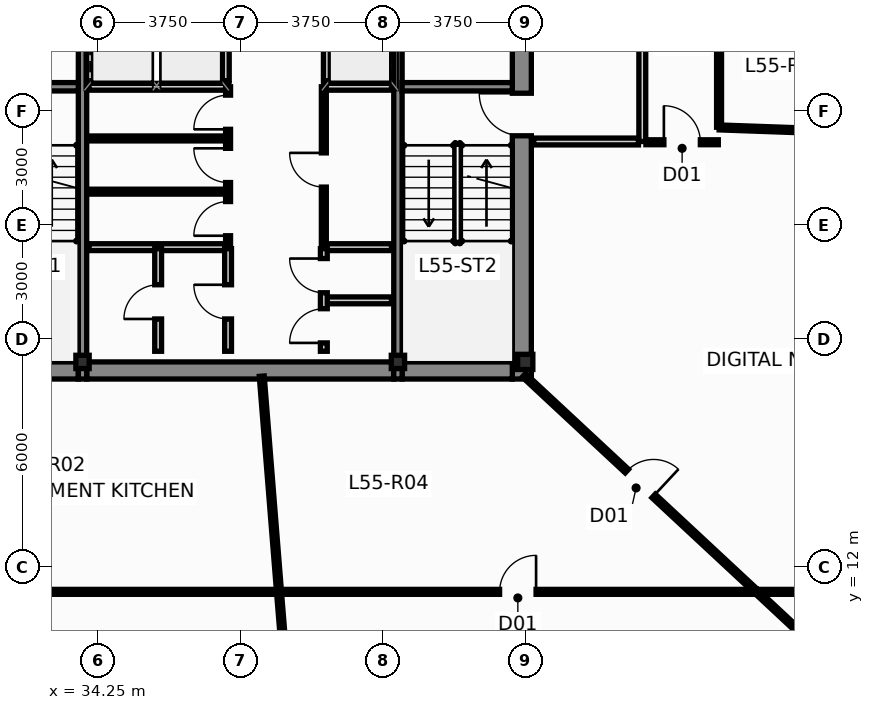
"""IFC4 building model, lengths in metres.
Left out: names, types, materials, properties, quantities, classifications, styles, units other than length and angle.
Written with IfcOpenShell. Run it as: python <this file> out.ifc"""

import sys

from ifc_helpers import new_model, si_unit, direction, frame, frame_2d, origin, origin_2d, place, context, subcontext, project, spatial, rectangle, hollow_rectangle, i_section, extrude, source, transform, mapped, element, fill, save


model = new_model("IFC4")
c1 = context("Model", 3, precision=1e-05, world=origin(), true_north=direction((0.0, 1.0)))
c2 = subcontext(c1, "Body", "Model", "MODEL_VIEW")
j1 = project(units=[si_unit("LENGTHUNIT", "METRE"), si_unit("PLANEANGLEUNIT", "RADIAN")], contexts=[c1])
p1 = place(None, origin())
s1 = spatial("IfcSite", under=j1, at=p1, CompositionType="ELEMENT")
p2 = place(p1, origin())
s2 = spatial("IfcBuilding", under=s1, at=p2, CompositionType="ELEMENT")
p3 = place(p2, frame((0.0, 0.0, 209.6)))
s3 = spatial("IfcBuildingStorey", under=s2, at=p3, CompositionType="ELEMENT", Elevation=209.6)
m1 = source(origin(), c2, "Body", "SweptSolid", [
    extrude(i_section(OverallWidth=0.4, OverallDepth=0.4, WebThickness=0.02, FlangeThickness=0.032, at=origin_2d()), origin(), (0.0, 0.0, 1.0), 3.65),
])
p4 = place(p3, frame((45.5, 17.4, 0.0), z_axis=(0.0, 0.0, 1.0), x_axis=(1.0, 0.0, 0.0)))
e1 = element("IfcColumn", 1, at=p4, inside=s3, PredefinedType="COLUMN", context=c2, shape_type="MappedRepresentation", body=[
    mapped(m1, transform((0.0, 0.0, 0.0), scale=1.0)),
])
m2 = source(origin(), c2, "Body", "SweptSolid", [
    extrude(hollow_rectangle(XDim=0.35, YDim=0.35, WallThickness=0.016, at=origin_2d()), origin(), (0.0, 0.0, 1.0), 3.65),
])
for number, where, z_axis, x_axis in (
    (2, (33.85, 17.4, 0.0), (0.0, 0.0, 1.0), (1.0, 0.0, 0.0)),
    (3, (42.15, 17.4, 0.0), (0.0, 0.0, 1.0), (1.0, 0.0, 0.0)),
):
    element("IfcColumn", number, at=place(p3, frame(where, z_axis=z_axis, x_axis=x_axis)), inside=s3, PredefinedType="COLUMN", context=c2, shape_type="MappedRepresentation", body=[
        mapped(m2, transform((0.0, 0.0, 0.0), scale=1.0)),
    ])
p5 = place(p3, frame((45.41, 16.95, 0.0), z_axis=(0.0, 0.0, 1.0), x_axis=(0.0, 1.0, 0.0)))
e4 = element("IfcWall", 4, at=p5, inside=s3, PredefinedType="SHEAR", context=c2, shape_type="SweptSolid", body=[
    extrude(rectangle(XDim=13.275, YDim=0.5, at=frame_2d((6.638, 0.0))), origin(), (0.0, 0.0, 1.0), 3.65),
])
p6 = place(p5, frame((6.4, 0.0, 0.0)))
e5 = element("IfcOpeningElement", 5, at=p6, cuts=e4, PredefinedType="OPENING", context=c2, shape_type="SweptSolid", body=[
    extrude(rectangle(XDim=1.12, YDim=2.15, at=frame_2d((0.56, 1.075))), frame((0.0, 0.262, 0.0), z_axis=(0.0, -1.0, 0.0), x_axis=(1.0, 0.0, 0.0)), (0.0, 0.0, 1.0), 0.524),
])
p7 = place(p5, frame((10.85, 0.0, 0.0)))
e6 = element("IfcOpeningElement", 6, at=p7, cuts=e4, PredefinedType="OPENING", context=c2, shape_type="SweptSolid", body=[
    extrude(rectangle(XDim=1.2, YDim=2.2, at=frame_2d((0.6, 1.1))), frame((0.0, 0.262, 0.0), z_axis=(0.0, -1.0, 0.0), x_axis=(1.0, 0.0, 0.0)), (0.0, 0.0, 1.0), 0.524),
])
p8 = place(p3, frame((30.84, 17.175, 0.0), z_axis=(0.0, 0.0, 1.0), x_axis=(1.0, 0.0, 0.0)))
e7 = element("IfcWall", 7, at=p8, inside=s3, PredefinedType="SHEAR", context=c2, shape_type="SweptSolid", body=[
    extrude(rectangle(XDim=2.9, YDim=0.45, at=frame_2d((1.45, 0.0))), origin(), (0.0, 0.0, 1.0), 3.65),
])
p9 = place(p3, frame((33.96, 17.175, 0.0), z_axis=(0.0, 0.0, 1.0), x_axis=(1.0, 0.0, 0.0)))
e8 = element("IfcWall", 8, at=p9, inside=s3, PredefinedType="SHEAR", context=c2, shape_type="SweptSolid", body=[
    extrude(rectangle(XDim=8.08, YDim=0.45, at=frame_2d((4.04, 0.0))), origin(), (0.0, 0.0, 1.0), 3.65),
])
p10 = place(p3, frame((42.26, 17.175, 0.0), z_axis=(0.0, 0.0, 1.0), x_axis=(1.0, 0.0, 0.0)))
e9 = element("IfcWall", 9, at=p10, inside=s3, PredefinedType="SHEAR", context=c2, shape_type="SweptSolid", body=[
    extrude(rectangle(XDim=2.9, YDim=0.45, at=frame_2d((1.45, 0.0))), origin(), (0.0, 0.0, 1.0), 3.65),
])
for number, where, z_axis, x_axis in (
    (10, (33.85, 16.95, 0.0), (0.0, 0.0, 1.0), (0.0, 1.0, 0.0)),
    (11, (42.15, 16.95, 0.0), (0.0, 0.0, 1.0), (0.0, 1.0, 0.0)),
):
    element("IfcWall", number, at=place(p3, frame(where, z_axis=z_axis, x_axis=x_axis)), inside=s3, PredefinedType="SHEAR", context=c2, shape_type="SweptSolid", body=[
        extrude(rectangle(XDim=13.275, YDim=0.22, at=frame_2d((6.638, 0.0))), origin(), (0.0, 0.0, 1.0), 3.65),
    ])
for number, where, z_axis, x_axis in (
    (12, (30.84, 24.64, 0.0), (0.0, 0.0, 1.0), (1.0, 0.0, 0.0)),
    (13, (42.26, 24.64, 0.0), (0.0, 0.0, 1.0), (1.0, 0.0, 0.0)),
):
    element("IfcWall", number, at=place(p3, frame(where, z_axis=z_axis, x_axis=x_axis)), inside=s3, PredefinedType="SHEAR", context=c2, shape_type="SweptSolid", body=[
        extrude(rectangle(XDim=2.9, YDim=0.22, at=frame_2d((1.45, 0.0))), origin(), (0.0, 0.0, 1.0), 3.65),
    ])
for number, where, z_axis, x_axis in (
    (14, (37.62, 24.8, 0.0), (0.0, 0.0, 1.0), (0.0, 1.0, 0.0)),
    (15, (40.28, 24.8, 0.0), (0.0, 0.0, 1.0), (0.0, 1.0, 0.0)),
):
    element("IfcWall", number, at=place(p3, frame(where, z_axis=z_axis, x_axis=x_axis)), inside=s3, PredefinedType="PARTITIONING", context=c2, shape_type="SweptSolid", body=[
        extrude(rectangle(XDim=2.0, YDim=0.18, at=frame_2d((1.0, 0.0))), origin(), (0.0, 0.0, 1.0), 3.4),
    ])
p11 = place(p3, frame((34.02, 24.64, 0.0), z_axis=(0.0, 0.0, 1.0), x_axis=(1.0, 0.0, 0.0)))
e16 = element("IfcWall", 16, at=p11, inside=s3, PredefinedType="PARTITIONING", context=c2, shape_type="SweptSolid", body=[
    extrude(rectangle(XDim=3.68, YDim=0.18, at=frame_2d((1.84, 0.0))), origin(), (0.0, 0.0, 1.0), 3.4),
])
p12 = place(p3, frame((40.2, 24.64, 0.0), z_axis=(0.0, 0.0, 1.0), x_axis=(1.0, 0.0, 0.0)))
e17 = element("IfcWall", 17, at=p12, inside=s3, PredefinedType="PARTITIONING", context=c2, shape_type="SweptSolid", body=[
    extrude(rectangle(XDim=1.78, YDim=0.18, at=frame_2d((0.89, 0.0))), origin(), (0.0, 0.0, 1.0), 3.4),
])
p13 = place(p3, frame((48.58, 23.2, 0.0), z_axis=(0.0, 0.0, 1.0), x_axis=(0.0, 1.0, 0.0)))
e18 = element("IfcWall", 18, at=p13, inside=s3, PredefinedType="PARTITIONING", context=c2, shape_type="SweptSolid", body=[
    extrude(rectangle(XDim=6.4, YDim=0.18, at=frame_2d((3.2, 0.0))), origin(), (0.0, 0.0, 1.0), 3.078),
])
p14 = place(p13, frame((2.65, 0.0, 0.0)))
e19 = element("IfcOpeningElement", 19, at=p14, cuts=e18, PredefinedType="OPENING", context=c2, shape_type="SweptSolid", body=[
    extrude(rectangle(XDim=1.05, YDim=2.15, at=frame_2d((0.525, 1.075))), frame((0.0, 0.102, 0.0), z_axis=(0.0, -1.0, 0.0), x_axis=(1.0, 0.0, 0.0)), (0.0, 0.0, 1.0), 0.204),
])
p15 = place(p3, frame((45.72, 23.2, 0.0), z_axis=(0.0, 0.0, 1.0), x_axis=(1.0, 0.0, 0.0)))
e20 = element("IfcWall", 20, at=p15, inside=s3, PredefinedType="PARTITIONING", context=c2, shape_type="SweptSolid", body=[
    extrude(rectangle(XDim=2.76, YDim=0.18, at=frame_2d((1.38, 0.0))), origin(), (0.0, 0.0, 1.0), 3.4),
])
p16 = place(p3, frame((34.02, 20.42, 0.0), z_axis=(0.0, 0.0, 1.0), x_axis=(1.0, 0.0, 0.0)))
e21 = element("IfcWall", 21, at=p16, inside=s3, PredefinedType="PARTITIONING", context=c2, shape_type="SweptSolid", body=[
    extrude(rectangle(XDim=3.64, YDim=0.18, at=frame_2d((1.82, 0.0))), origin(), (0.0, 0.0, 1.0), 3.4),
])
p17 = place(p3, frame((40.22, 20.42, 0.0), z_axis=(0.0, 0.0, 1.0), x_axis=(1.0, 0.0, 0.0)))
e22 = element("IfcWall", 22, at=p17, inside=s3, PredefinedType="PARTITIONING", context=c2, shape_type="SweptSolid", body=[
    extrude(rectangle(XDim=1.76, YDim=0.18, at=frame_2d((0.88, 0.0))), origin(), (0.0, 0.0, 1.0), 3.4),
])
for number, where, z_axis, x_axis in (
    (23, (34.02, 21.88, 0.0), (0.0, 0.0, 1.0), (1.0, 0.0, 0.0)),
    (24, (34.02, 23.28, 0.0), (0.0, 0.0, 1.0), (1.0, 0.0, 0.0)),
):
    element("IfcWall", number, at=place(p3, frame(where, z_axis=z_axis, x_axis=x_axis)), inside=s3, PredefinedType="PARTITIONING", context=c2, shape_type="SweptSolid", body=[
        extrude(rectangle(XDim=3.58, YDim=0.13, at=frame_2d((1.79, 0.0))), origin(), (0.0, 0.0, 1.0), 3.4),
    ])
p18 = place(p3, frame((37.68, 20.5, 0.0), z_axis=(0.0, 0.0, 1.0), x_axis=(0.0, 1.0, 0.0)))
e25 = element("IfcWall", 25, at=p18, inside=s3, PredefinedType="PARTITIONING", context=c2, shape_type="SweptSolid", body=[
    extrude(rectangle(XDim=4.14, YDim=0.13, at=frame_2d((2.07, 0.0))), origin(), (0.0, 0.0, 1.0), 3.4),
])
p19 = place(p18, frame((0.22, 0.0, 0.0)))
e26 = element("IfcOpeningElement", 26, at=p19, cuts=e25, PredefinedType="OPENING", context=c2, shape_type="SweptSolid", body=[
    extrude(rectangle(XDim=0.9, YDim=2.1, at=frame_2d((0.45, 1.05))), frame((0.0, 0.077, 0.0), z_axis=(0.0, -1.0, 0.0), x_axis=(1.0, 0.0, 0.0)), (0.0, 0.0, 1.0), 0.154),
])
p20 = place(p18, frame((1.62, 0.0, 0.0)))
e27 = element("IfcOpeningElement", 27, at=p20, cuts=e25, PredefinedType="OPENING", context=c2, shape_type="SweptSolid", body=[
    extrude(rectangle(XDim=0.9, YDim=2.1, at=frame_2d((0.45, 1.05))), frame((0.0, 0.077, 0.0), z_axis=(0.0, -1.0, 0.0), x_axis=(1.0, 0.0, 0.0)), (0.0, 0.0, 1.0), 0.154),
])
p21 = place(p18, frame((3.02, 0.0, 0.0)))
e28 = element("IfcOpeningElement", 28, at=p21, cuts=e25, PredefinedType="OPENING", context=c2, shape_type="SweptSolid", body=[
    extrude(rectangle(XDim=0.9, YDim=2.1, at=frame_2d((0.45, 1.05))), frame((0.0, 0.077, 0.0), z_axis=(0.0, -1.0, 0.0), x_axis=(1.0, 0.0, 0.0)), (0.0, 0.0, 1.0), 0.154),
])
p22 = place(p3, frame((40.2, 20.5, 0.0), z_axis=(0.0, 0.0, 1.0), x_axis=(0.0, 1.0, 0.0)))
e29 = element("IfcWall", 29, at=p22, inside=s3, PredefinedType="PARTITIONING", context=c2, shape_type="SweptSolid", body=[
    extrude(rectangle(XDim=4.14, YDim=0.13, at=frame_2d((2.07, 0.0))), origin(), (0.0, 0.0, 1.0), 3.4),
])
p23 = place(p22, frame((1.5, 0.0, 0.0)))
e30 = element("IfcOpeningElement", 30, at=p23, cuts=e29, PredefinedType="OPENING", context=c2, shape_type="SweptSolid", body=[
    extrude(rectangle(XDim=0.9, YDim=2.1, at=frame_2d((0.45, 1.05))), frame((0.0, 0.077, 0.0), z_axis=(0.0, -1.0, 0.0), x_axis=(1.0, 0.0, 0.0)), (0.0, 0.0, 1.0), 0.154),
])
p24 = place(p3, frame((35.84, 17.68, 0.0), z_axis=(0.0, 0.0, 1.0), x_axis=(0.0, 1.0, 0.0)))
e31 = element("IfcWall", 31, at=p24, inside=s3, PredefinedType="PARTITIONING", context=c2, shape_type="SweptSolid", body=[
    extrude(rectangle(XDim=2.7, YDim=0.18, at=frame_2d((1.35, 0.0))), origin(), (0.0, 0.0, 1.0), 3.4),
])
p25 = place(p24, frame((0.85, 0.0, 0.0)))
e32 = element("IfcOpeningElement", 32, at=p25, cuts=e31, PredefinedType="OPENING", context=c2, shape_type="SweptSolid", body=[
    extrude(rectangle(XDim=0.9, YDim=2.1, at=frame_2d((0.45, 1.05))), frame((0.0, 0.102, 0.0), z_axis=(0.0, -1.0, 0.0), x_axis=(1.0, 0.0, 0.0)), (0.0, 0.0, 1.0), 0.204),
])
p26 = place(p3, frame((37.68, 17.68, 0.0), z_axis=(0.0, 0.0, 1.0), x_axis=(0.0, 1.0, 0.0)))
e33 = element("IfcWall", 33, at=p26, inside=s3, PredefinedType="PARTITIONING", context=c2, shape_type="SweptSolid", body=[
    extrude(rectangle(XDim=2.7, YDim=0.18, at=frame_2d((1.35, 0.0))), origin(), (0.0, 0.0, 1.0), 3.4),
])
p27 = place(p26, frame((0.85, 0.0, 0.0)))
e34 = element("IfcOpeningElement", 34, at=p27, cuts=e33, PredefinedType="OPENING", context=c2, shape_type="SweptSolid", body=[
    extrude(rectangle(XDim=0.9, YDim=2.1, at=frame_2d((0.45, 1.05))), frame((0.0, 0.102, 0.0), z_axis=(0.0, -1.0, 0.0), x_axis=(1.0, 0.0, 0.0)), (0.0, 0.0, 1.0), 0.204),
])
p28 = place(p3, frame((40.28, 19.02, 0.0), z_axis=(0.0, 0.0, 1.0), x_axis=(1.0, 0.0, 0.0)))
e35 = element("IfcWall", 35, at=p28, inside=s3, PredefinedType="PARTITIONING", context=c2, shape_type="SweptSolid", body=[
    extrude(rectangle(XDim=1.7, YDim=0.18, at=frame_2d((0.85, 0.0))), origin(), (0.0, 0.0, 1.0), 3.4),
])
p29 = place(p3, frame((40.2, 17.68, 0.0), z_axis=(0.0, 0.0, 1.0), x_axis=(0.0, 1.0, 0.0)))
e36 = element("IfcWall", 36, at=p29, inside=s3, PredefinedType="PARTITIONING", context=c2, shape_type="SweptSolid", body=[
    extrude(rectangle(XDim=2.7, YDim=0.18, at=frame_2d((1.35, 0.0))), origin(), (0.0, 0.0, 1.0), 3.4),
])
p30 = place(p29, frame((0.22, 0.0, 0.0)))
e37 = element("IfcOpeningElement", 37, at=p30, cuts=e36, PredefinedType="OPENING", context=c2, shape_type="SweptSolid", body=[
    extrude(rectangle(XDim=0.9, YDim=2.1, at=frame_2d((0.45, 1.05))), frame((0.0, 0.102, 0.0), z_axis=(0.0, -1.0, 0.0), x_axis=(1.0, 0.0, 0.0)), (0.0, 0.0, 1.0), 0.204),
])
p31 = place(p29, frame((1.54, 0.0, 0.0)))
e38 = element("IfcOpeningElement", 38, at=p31, cuts=e36, PredefinedType="OPENING", context=c2, shape_type="SweptSolid", body=[
    extrude(rectangle(XDim=0.9, YDim=2.1, at=frame_2d((0.45, 1.05))), frame((0.0, 0.102, 0.0), z_axis=(0.0, -1.0, 0.0), x_axis=(1.0, 0.0, 0.0)), (0.0, 0.0, 1.0), 0.204),
])
p32 = place(p3, frame((15.22, 11.35, 0.0), z_axis=(0.0, 0.0, 1.0), x_axis=(1.0, 0.0, 0.0)))
e39 = element("IfcWall", 39, at=p32, inside=s3, PredefinedType="PARTITIONING", context=c2, shape_type="SweptSolid", body=[
    extrude(rectangle(XDim=23.795, YDim=0.13, at=frame_2d((11.897, 0.0))), origin(), (0.0, 0.0, 1.0), 3.078),
])
p33 = place(p32, frame((11.473, 0.0, 0.0)))
e40 = element("IfcOpeningElement", 40, at=p33, cuts=e39, PredefinedType="OPENING", context=c2, shape_type="SweptSolid", body=[
    extrude(rectangle(XDim=0.96, YDim=2.15, at=frame_2d((0.48, 1.075))), frame((0.0, 0.077, 0.0), z_axis=(0.0, -1.0, 0.0), x_axis=(1.0, 0.0, 0.0)), (0.0, 0.0, 1.0), 0.154),
])
p34 = place(p3, frame((39.025, 11.35, 0.0), z_axis=(0.0, 0.0, 1.0), x_axis=(1.0, 0.0, 0.0)))
e41 = element("IfcWall", 41, at=p34, inside=s3, PredefinedType="PARTITIONING", context=c2, shape_type="SweptSolid", body=[
    extrude(rectangle(XDim=12.56, YDim=0.13, at=frame_2d((6.28, 0.0))), origin(), (0.0, 0.0, 1.0), 3.078),
])
p35 = place(p34, frame((5.8, 0.0, 0.0)))
e42 = element("IfcOpeningElement", 42, at=p35, cuts=e41, PredefinedType="OPENING", context=c2, shape_type="SweptSolid", body=[
    extrude(rectangle(XDim=0.96, YDim=2.15, at=frame_2d((0.48, 1.075))), frame((0.0, 0.077, 0.0), z_axis=(0.0, -1.0, 0.0), x_axis=(1.0, 0.0, 0.0)), (0.0, 0.0, 1.0), 0.154),
])
p36 = place(p3, frame((51.595, 11.35, 0.0), z_axis=(0.0, 0.0, 1.0), x_axis=(1.0, 0.0, 0.0)))
e43 = element("IfcWall", 43, at=p36, inside=s3, PredefinedType="PARTITIONING", context=c2, shape_type="SweptSolid", body=[
    extrude(rectangle(XDim=11.971, YDim=0.13, at=frame_2d((5.985, 0.0))), origin(), (0.0, 0.0, 1.0), 3.078),
])
p37 = place(p36, frame((5.558, 0.0, 0.0)))
e44 = element("IfcOpeningElement", 44, at=p37, cuts=e43, PredefinedType="OPENING", context=c2, shape_type="SweptSolid", body=[
    extrude(rectangle(XDim=0.96, YDim=2.15, at=frame_2d((0.48, 1.075))), frame((0.0, 0.077, 0.0), z_axis=(0.0, -1.0, 0.0), x_axis=(1.0, 0.0, 0.0)), (0.0, 0.0, 1.0), 0.154),
])
p38 = place(p3, frame((45.465, 17.049, 0.0), z_axis=(0.0, 0.0, 1.0), x_axis=(0.732053638731, -0.681246996339, 0.0)))
e45 = element("IfcWall", 45, at=p38, inside=s3, PredefinedType="PARTITIONING", context=c2, shape_type="SweptSolid", body=[
    extrude(rectangle(XDim=8.361, YDim=0.13, at=frame_2d((4.181, 0.0))), origin(), (0.0, 0.0, 1.0), 2.925),
])
p39 = place(p38, frame((3.701, 0.0, 0.0)))
e46 = element("IfcOpeningElement", 46, at=p39, cuts=e45, PredefinedType="OPENING", context=c2, shape_type="SweptSolid", body=[
    extrude(rectangle(XDim=0.96, YDim=2.15, at=frame_2d((0.48, 1.075))), frame((0.0, 0.077, 0.0), z_axis=(0.0, -1.0, 0.0), x_axis=(1.0, 0.0, 0.0)), (0.0, 0.0, 1.0), 0.154),
])
p40 = place(p3, frame((50.605, 23.57, 0.0), z_axis=(0.0, 0.0, 1.0), x_axis=(0.999370457371, -0.035478006355, 0.0)))
e47 = element("IfcWall", 47, at=p40, inside=s3, PredefinedType="PARTITIONING", context=c2, shape_type="SweptSolid", body=[
    extrude(rectangle(XDim=7.219, YDim=0.13, at=frame_2d((3.609, 0.0))), origin(), (0.0, 0.0, 1.0), 3.4),
])
p41 = place(p3, frame((50.6, 23.575, 0.0), z_axis=(0.0, 0.0, 1.0), x_axis=(0.0, 1.0, 0.0)))
e48 = element("IfcWall", 48, at=p41, inside=s3, PredefinedType="PARTITIONING", context=c2, shape_type="SweptSolid", body=[
    extrude(rectangle(XDim=6.52, YDim=0.13, at=frame_2d((3.26, 0.0))), origin(), (0.0, 0.0, 1.0), 3.078),
])
p42 = place(p41, frame((2.78, 0.0, 0.0)))
e49 = element("IfcOpeningElement", 49, at=p42, cuts=e48, PredefinedType="OPENING", context=c2, shape_type="SweptSolid", body=[
    extrude(rectangle(XDim=0.96, YDim=2.15, at=frame_2d((0.48, 1.075))), frame((0.0, 0.077, 0.0), z_axis=(0.0, -1.0, 0.0), x_axis=(1.0, 0.0, 0.0)), (0.0, 0.0, 1.0), 0.154),
])
p43 = place(p3, frame((51.594, 11.347, 0.0), z_axis=(0.0, 0.0, 1.0), x_axis=(0.731391359987, -0.681957974171, 0.0)))
e50 = element("IfcWall", 50, at=p43, inside=s3, PredefinedType="PARTITIONING", context=c2, shape_type="SweptSolid", body=[
    extrude(rectangle(XDim=5.699, YDim=0.13, at=frame_2d((2.85, 0.0))), origin(), (0.0, 0.0, 1.0), 2.925),
])
p44 = place(p3, frame((38.566, 17.025, 0.0), z_axis=(0.0, 0.0, 1.0), x_axis=(0.079833930884, -0.996808177876, 0.0)))
e51 = element("IfcWall", 51, at=p44, inside=s3, PredefinedType="PARTITIONING", context=c2, shape_type="SweptSolid", body=[
    extrude(rectangle(XDim=5.688, YDim=0.13, at=frame_2d((2.844, 0.0))), origin(), (0.0, 0.0, 1.0), 3.4),
])
p45 = place(p3, frame((39.02, 11.345, 0.0), z_axis=(0.0, 0.0, 1.0), x_axis=(0.081416716871, -0.9966801484, 0.0)))
e52 = element("IfcWall", 52, at=p45, inside=s3, PredefinedType="PARTITIONING", context=c2, shape_type="SweptSolid", body=[
    extrude(rectangle(XDim=3.709, YDim=0.13, at=frame_2d((1.854, 0.0))), origin(), (0.0, 0.0, 1.0), 3.4),
])
p46 = place(p3, frame((48.675, 23.18, 0.0), z_axis=(0.0, 0.0, 1.0), x_axis=(1.0, 0.0, 0.0)))
e53 = element("IfcWall", 53, at=p46, inside=s3, PredefinedType="PARTITIONING", context=c2, shape_type="SweptSolid", body=[
    extrude(rectangle(XDim=1.905, YDim=0.13, at=frame_2d((0.953, 0.0))), origin(), (0.0, 0.0, 1.0), 3.4),
])
p47 = place(p46, frame((0.473, 0.0, 0.0)))
e54 = element("IfcOpeningElement", 54, at=p47, cuts=e53, PredefinedType="OPENING", context=c2, shape_type="SweptSolid", body=[
    extrude(rectangle(XDim=0.96, YDim=2.15, at=frame_2d((0.48, 1.075))), frame((0.0, 0.077, 0.0), z_axis=(0.0, -1.0, 0.0), x_axis=(1.0, 0.0, 0.0)), (0.0, 0.0, 1.0), 0.154),
])
p48 = place(p6, origin())
e55 = element("IfcDoor", 55, at=p48, inside=s3, OperationType="SINGLE_SWING_RIGHT", PredefinedType="DOOR", context=c2, shape_type="SweptSolid", body=[
    extrude(rectangle(XDim=1.12, YDim=2.15, at=frame_2d((0.56, 1.075))), frame((0.0, 0.025, 0.0), z_axis=(0.0, -1.0, 0.0), x_axis=(1.0, 0.0, 0.0)), (0.0, 0.0, 1.0), 0.05),
])
fill(e5, e55)
p49 = place(p19, origin())
e56 = element("IfcDoor", 56, at=p49, inside=s3, OperationType="SINGLE_SWING_LEFT", PredefinedType="DOOR", context=c2, shape_type="SweptSolid", body=[
    extrude(rectangle(XDim=0.9, YDim=2.1, at=frame_2d((0.45, 1.05))), frame((0.0, 0.025, 0.0), z_axis=(0.0, -1.0, 0.0), x_axis=(1.0, 0.0, 0.0)), (0.0, 0.0, 1.0), 0.05),
])
fill(e26, e56)
p50 = place(p20, origin())
e57 = element("IfcDoor", 57, at=p50, inside=s3, OperationType="SINGLE_SWING_RIGHT", PredefinedType="DOOR", context=c2, shape_type="SweptSolid", body=[
    extrude(rectangle(XDim=0.9, YDim=2.1, at=frame_2d((0.45, 1.05))), frame((0.0, 0.025, 0.0), z_axis=(0.0, -1.0, 0.0), x_axis=(1.0, 0.0, 0.0)), (0.0, 0.0, 1.0), 0.05),
])
fill(e27, e57)
p51 = place(p21, origin())
e58 = element("IfcDoor", 58, at=p51, inside=s3, OperationType="SINGLE_SWING_LEFT", PredefinedType="DOOR", context=c2, shape_type="SweptSolid", body=[
    extrude(rectangle(XDim=0.9, YDim=2.1, at=frame_2d((0.45, 1.05))), frame((0.0, 0.025, 0.0), z_axis=(0.0, -1.0, 0.0), x_axis=(1.0, 0.0, 0.0)), (0.0, 0.0, 1.0), 0.05),
])
fill(e28, e58)
p52 = place(p23, origin())
e59 = element("IfcDoor", 59, at=p52, inside=s3, OperationType="SINGLE_SWING_RIGHT", PredefinedType="DOOR", context=c2, shape_type="SweptSolid", body=[
    extrude(rectangle(XDim=0.9, YDim=2.1, at=frame_2d((0.45, 1.05))), frame((0.0, 0.025, 0.0), z_axis=(0.0, -1.0, 0.0), x_axis=(1.0, 0.0, 0.0)), (0.0, 0.0, 1.0), 0.05),
])
fill(e30, e59)
p53 = place(p25, origin())
e60 = element("IfcDoor", 60, at=p53, inside=s3, OperationType="SINGLE_SWING_LEFT", PredefinedType="DOOR", context=c2, shape_type="SweptSolid", body=[
    extrude(rectangle(XDim=0.9, YDim=2.1, at=frame_2d((0.45, 1.05))), frame((0.0, 0.025, 0.0), z_axis=(0.0, -1.0, 0.0), x_axis=(1.0, 0.0, 0.0)), (0.0, 0.0, 1.0), 0.05),
])
fill(e32, e60)
p54 = place(p27, origin())
e61 = element("IfcDoor", 61, at=p54, inside=s3, OperationType="SINGLE_SWING_RIGHT", PredefinedType="DOOR", context=c2, shape_type="SweptSolid", body=[
    extrude(rectangle(XDim=0.9, YDim=2.1, at=frame_2d((0.45, 1.05))), frame((0.0, 0.025, 0.0), z_axis=(0.0, -1.0, 0.0), x_axis=(1.0, 0.0, 0.0)), (0.0, 0.0, 1.0), 0.05),
])
fill(e34, e61)
p55 = place(p30, origin())
e62 = element("IfcDoor", 62, at=p55, inside=s3, OperationType="SINGLE_SWING_LEFT", PredefinedType="DOOR", context=c2, shape_type="SweptSolid", body=[
    extrude(rectangle(XDim=0.9, YDim=2.1, at=frame_2d((0.45, 1.05))), frame((0.0, 0.025, 0.0), z_axis=(0.0, -1.0, 0.0), x_axis=(1.0, 0.0, 0.0)), (0.0, 0.0, 1.0), 0.05),
])
fill(e37, e62)
p56 = place(p31, origin())
e63 = element("IfcDoor", 63, at=p56, inside=s3, OperationType="SINGLE_SWING_RIGHT", PredefinedType="DOOR", context=c2, shape_type="SweptSolid", body=[
    extrude(rectangle(XDim=0.9, YDim=2.1, at=frame_2d((0.45, 1.05))), frame((0.0, 0.025, 0.0), z_axis=(0.0, -1.0, 0.0), x_axis=(1.0, 0.0, 0.0)), (0.0, 0.0, 1.0), 0.05),
])
fill(e38, e63)
p57 = place(p35, origin())
e64 = element("IfcDoor", 64, at=p57, inside=s3, OperationType="SINGLE_SWING_RIGHT", PredefinedType="DOOR", context=c2, shape_type="SweptSolid", body=[
    extrude(rectangle(XDim=0.96, YDim=2.15, at=frame_2d((0.48, 1.075))), frame((0.0, 0.025, 0.0), z_axis=(0.0, -1.0, 0.0), x_axis=(1.0, 0.0, 0.0)), (0.0, 0.0, 1.0), 0.05),
])
fill(e42, e64)
p58 = place(p39, origin())
e65 = element("IfcDoor", 65, at=p58, inside=s3, OperationType="SINGLE_SWING_RIGHT", PredefinedType="DOOR", context=c2, shape_type="SweptSolid", body=[
    extrude(rectangle(XDim=0.96, YDim=2.15, at=frame_2d((0.48, 1.075))), frame((0.0, 0.025, 0.0), z_axis=(0.0, -1.0, 0.0), x_axis=(1.0, 0.0, 0.0)), (0.0, 0.0, 1.0), 0.05),
])
fill(e46, e65)
p59 = place(p47, origin())
e66 = element("IfcDoor", 66, at=p59, inside=s3, OperationType="SINGLE_SWING_LEFT", PredefinedType="DOOR", context=c2, shape_type="SweptSolid", body=[
    extrude(rectangle(XDim=0.96, YDim=2.15, at=frame_2d((0.48, 1.075))), frame((0.0, 0.025, 0.0), z_axis=(0.0, -1.0, 0.0), x_axis=(1.0, 0.0, 0.0)), (0.0, 0.0, 1.0), 0.05),
])
fill(e54, e66)
save(model, sys.argv[1])
